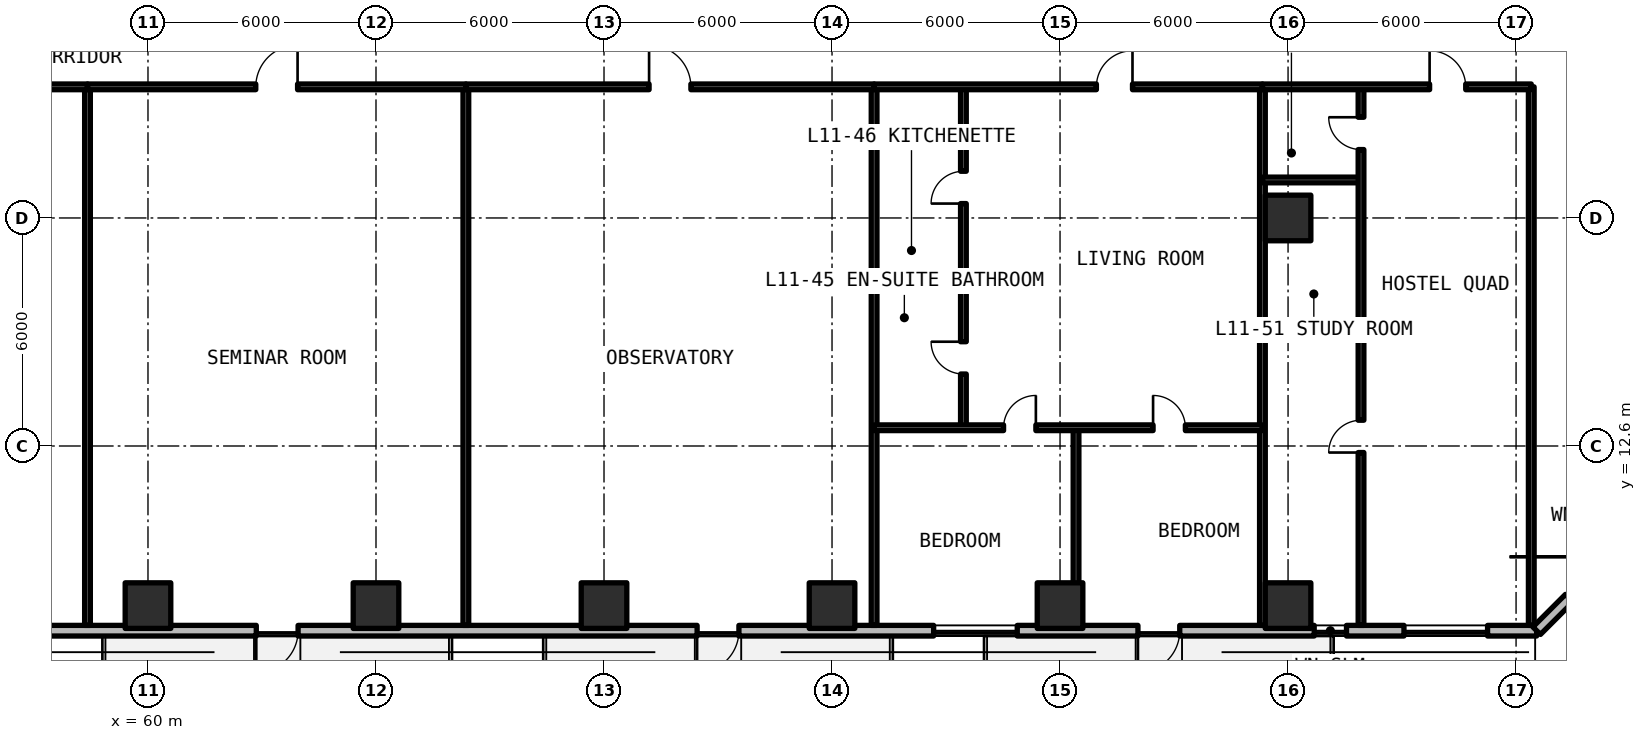
"""IFC4 building model, lengths in metres.
Left out: names, types, materials, properties, quantities, classifications, styles, units other than length and angle.
Written with IfcOpenShell. Run it as: python <this file> out.ifc"""

import sys

from ifc_helpers import new_model, si_unit, direction, frame, frame_2d, origin, origin_2d, place, context, subcontext, project, spatial, rectangle, extrude, element, fill, save


model = new_model("IFC4")
c1 = context("Model", 3, precision=1e-05, world=origin(), true_north=direction((0.0, 1.0)))
c2 = subcontext(c1, "Body", "Model", "MODEL_VIEW")
j1 = project(units=[si_unit("LENGTHUNIT", "METRE"), si_unit("PLANEANGLEUNIT", "RADIAN")], contexts=[c1])
p1 = place(None, origin())
s1 = spatial("IfcSite", under=j1, at=p1, CompositionType="ELEMENT")
p2 = place(p1, origin())
s2 = spatial("IfcBuilding", under=s1, at=p2, CompositionType="ELEMENT")
p3 = place(p2, frame((0.0, 0.0, 42.24)))
s3 = spatial("IfcBuildingStorey", under=s2, at=p3, CompositionType="ELEMENT", Elevation=42.24)
for number, where, z_axis, x_axis in (
    (1, (90.0, 18.6, 0.0), (0.0, 0.0, 1.0), (1.0, 0.0, 0.0)),
    (2, (60.0, 8.4, 0.0), (0.0, 0.0, 1.0), (1.0, 0.0, 0.0)),
    (3, (66.0, 8.4, 0.0), (0.0, 0.0, 1.0), (1.0, 0.0, 0.0)),
    (4, (72.0, 8.4, 0.0), (0.0, 0.0, 1.0), (1.0, 0.0, 0.0)),
    (5, (78.0, 8.4, 0.0), (0.0, 0.0, 1.0), (1.0, 0.0, 0.0)),
    (6, (84.0, 8.4, 0.0), (0.0, 0.0, 1.0), (1.0, 0.0, 0.0)),
    (7, (90.0, 8.4, 0.0), (0.0, 0.0, 1.0), (1.0, 0.0, 0.0)),
):
    element("IfcColumn", number, at=place(p3, frame(where, z_axis=z_axis, x_axis=x_axis)), inside=s3, PredefinedType="COLUMN", context=c2, shape_type="SweptSolid", body=[
        extrude(rectangle(XDim=1.2, YDim=1.2, at=origin_2d()), origin(), (0.0, 0.0, 1.0), 3.3),
    ])
p4 = place(p3, frame((52.14, 7.74, 0.0), z_axis=(0.0, 0.0, 1.0), x_axis=(1.0, 0.0, 0.0)))
e8 = element("IfcWall", 8, at=p4, inside=s3, PredefinedType="SOLIDWALL", context=c2, shape_type="SweptSolid", body=[
    extrude(rectangle(XDim=44.402, YDim=0.28, at=frame_2d((22.201, 0.0))), origin(), (0.0, 0.0, 1.0), 3.08),
])
p5 = place(p4, frame((10.71, 0.0, 0.0)))
e9 = element("IfcOpeningElement", 9, at=p5, cuts=e8, PredefinedType="OPENING", context=c2, shape_type="SweptSolid", body=[
    extrude(rectangle(XDim=1.1, YDim=2.15, at=frame_2d((0.55, 1.075))), frame((0.0, 0.15, 0.0), z_axis=(0.0, -1.0, 0.0), x_axis=(1.0, 0.0, 0.0)), (0.0, 0.0, 1.0), 0.3),
])
p6 = place(p4, frame((22.31, 0.0, 0.0)))
e10 = element("IfcOpeningElement", 10, at=p6, cuts=e8, PredefinedType="OPENING", context=c2, shape_type="SweptSolid", body=[
    extrude(rectangle(XDim=1.1, YDim=2.15, at=frame_2d((0.55, 1.075))), frame((0.0, 0.15, 0.0), z_axis=(0.0, -1.0, 0.0), x_axis=(1.0, 0.0, 0.0)), (0.0, 0.0, 1.0), 0.3),
])
p7 = place(p4, frame((33.91, 0.0, 0.0)))
e11 = element("IfcOpeningElement", 11, at=p7, cuts=e8, PredefinedType="OPENING", context=c2, shape_type="SweptSolid", body=[
    extrude(rectangle(XDim=1.1, YDim=2.15, at=frame_2d((0.55, 1.075))), frame((0.0, 0.15, 0.0), z_axis=(0.0, -1.0, 0.0), x_axis=(1.0, 0.0, 0.0)), (0.0, 0.0, 1.0), 0.3),
])
p8 = place(p4, frame((2.664, 0.0, 0.78)))
e12 = element("IfcOpeningElement", 12, at=p8, cuts=e8, PredefinedType="OPENING", context=c2, shape_type="SweptSolid", body=[
    extrude(rectangle(XDim=2.2, YDim=1.66, at=frame_2d((1.1, 0.83))), frame((0.0, 0.15, 0.0), z_axis=(0.0, -1.0, 0.0), x_axis=(1.0, 0.0, 0.0)), (0.0, 0.0, 1.0), 0.3),
])
p9 = place(p4, frame((28.534, 0.0, 0.78)))
e13 = element("IfcOpeningElement", 13, at=p9, cuts=e8, PredefinedType="OPENING", context=c2, shape_type="SweptSolid", body=[
    extrude(rectangle(XDim=2.2, YDim=1.66, at=frame_2d((1.1, 0.83))), frame((0.0, 0.15, 0.0), z_axis=(0.0, -1.0, 0.0), x_axis=(1.0, 0.0, 0.0)), (0.0, 0.0, 1.0), 0.3),
])
p10 = place(p4, frame((38.548, 0.0, 0.78)))
e14 = element("IfcOpeningElement", 14, at=p10, cuts=e8, PredefinedType="OPENING", context=c2, shape_type="SweptSolid", body=[
    extrude(rectangle(XDim=0.85, YDim=1.65, at=frame_2d((0.425, 0.825))), frame((0.0, 0.15, 0.0), z_axis=(0.0, -1.0, 0.0), x_axis=(1.0, 0.0, 0.0)), (0.0, 0.0, 1.0), 0.3),
])
p11 = place(p4, frame((40.91, 0.0, 0.78)))
e15 = element("IfcOpeningElement", 15, at=p11, cuts=e8, PredefinedType="OPENING", context=c2, shape_type="SweptSolid", body=[
    extrude(rectangle(XDim=2.2, YDim=1.66, at=frame_2d((1.1, 0.83))), frame((0.0, 0.15, 0.0), z_axis=(0.0, -1.0, 0.0), x_axis=(1.0, 0.0, 0.0)), (0.0, 0.0, 1.0), 0.3),
])
p12 = place(p3, frame((96.542, 7.74, 0.0), z_axis=(0.0, 0.0, 1.0), x_axis=(0.707106781187, 0.707106781187, 0.0)))
e16 = element("IfcWall", 16, at=p12, inside=s3, PredefinedType="SOLIDWALL", context=c2, shape_type="SweptSolid", body=[
    extrude(rectangle(XDim=5.824, YDim=0.28, at=frame_2d((2.912, 0.0))), origin(), (0.0, 0.0, 1.0), 3.08),
])
p13 = place(p12, frame((1.212, 0.0, 0.78)))
e17 = element("IfcOpeningElement", 17, at=p13, cuts=e16, PredefinedType="OPENING", context=c2, shape_type="SweptSolid", body=[
    extrude(rectangle(XDim=3.4, YDim=1.66, at=frame_2d((1.7, 0.83))), frame((0.0, 0.15, 0.0), z_axis=(0.0, -1.0, 0.0), x_axis=(1.0, 0.0, 0.0)), (0.0, 0.0, 1.0), 0.3),
])
for number, where, z_axis, x_axis in (
    (18, (96.4, 7.88, 0.0), (0.0, 0.0, 1.0), (0.0, 1.0, 0.0)),
    (19, (58.408, 7.88, 0.0), (0.0, 0.0, 1.0), (0.0, 1.0, 0.0)),
):
    element("IfcWall", number, at=place(p3, frame(where, z_axis=z_axis, x_axis=x_axis)), inside=s3, PredefinedType="SOLIDWALL", context=c2, shape_type="SweptSolid", body=[
        extrude(rectangle(XDim=14.17, YDim=0.15, at=frame_2d((7.085, 0.0))), origin(), (0.0, 0.0, 1.0), 2.35),
    ])
p14 = place(p3, frame((52.12, 22.05, 0.0), z_axis=(0.0, 0.0, 1.0), x_axis=(1.0, 0.0, 0.0)))
e20 = element("IfcWall", 20, at=p14, inside=s3, PredefinedType="SOLIDWALL", context=c2, shape_type="SweptSolid", body=[
    extrude(rectangle(XDim=6.288, YDim=0.15, at=frame_2d((3.144, 0.0))), origin(), (0.0, 0.0, 1.0), 2.35),
])
p15 = place(p14, frame((2.669, 0.0, 0.0)))
e21 = element("IfcOpeningElement", 21, at=p15, cuts=e20, PredefinedType="OPENING", context=c2, shape_type="SweptSolid", body=[
    extrude(rectangle(XDim=0.95, YDim=2.15, at=frame_2d((0.475, 1.075))), frame((0.0, 0.085, 0.0), z_axis=(0.0, -1.0, 0.0), x_axis=(1.0, 0.0, 0.0)), (0.0, 0.0, 1.0), 0.17),
])
p16 = place(p3, frame((68.365, 7.88, 0.0), z_axis=(0.0, 0.0, 1.0), x_axis=(0.0, 1.0, 0.0)))
e22 = element("IfcWall", 22, at=p16, inside=s3, PredefinedType="SOLIDWALL", context=c2, shape_type="SweptSolid", body=[
    extrude(rectangle(XDim=14.17, YDim=0.15, at=frame_2d((7.085, 0.0))), origin(), (0.0, 0.0, 1.0), 2.35),
])
p17 = place(p3, frame((58.408, 22.05, 0.0), z_axis=(0.0, 0.0, 1.0), x_axis=(1.0, 0.0, 0.0)))
e23 = element("IfcWall", 23, at=p17, inside=s3, PredefinedType="SOLIDWALL", context=c2, shape_type="SweptSolid", body=[
    extrude(rectangle(XDim=9.957, YDim=0.15, at=frame_2d((4.978, 0.0))), origin(), (0.0, 0.0, 1.0), 2.35),
])
p18 = place(p17, frame((4.428, 0.0, 0.0)))
e24 = element("IfcOpeningElement", 24, at=p18, cuts=e23, PredefinedType="OPENING", context=c2, shape_type="SweptSolid", body=[
    extrude(rectangle(XDim=1.1, YDim=2.15, at=frame_2d((0.55, 1.075))), frame((0.0, 0.085, 0.0), z_axis=(0.0, -1.0, 0.0), x_axis=(1.0, 0.0, 0.0)), (0.0, 0.0, 1.0), 0.17),
])
p19 = place(p3, frame((79.107, 7.88, 0.0), z_axis=(0.0, 0.0, 1.0), x_axis=(0.0, 1.0, 0.0)))
e25 = element("IfcWall", 25, at=p19, inside=s3, PredefinedType="SOLIDWALL", context=c2, shape_type="SweptSolid", body=[
    extrude(rectangle(XDim=14.17, YDim=0.15, at=frame_2d((7.085, 0.0))), origin(), (0.0, 0.0, 1.0), 2.35),
])
p20 = place(p3, frame((68.365, 22.05, 0.0), z_axis=(0.0, 0.0, 1.0), x_axis=(1.0, 0.0, 0.0)))
e26 = element("IfcWall", 26, at=p20, inside=s3, PredefinedType="SOLIDWALL", context=c2, shape_type="SweptSolid", body=[
    extrude(rectangle(XDim=10.742, YDim=0.15, at=frame_2d((5.371, 0.0))), origin(), (0.0, 0.0, 1.0), 2.35),
])
p21 = place(p20, frame((4.821, 0.0, 0.0)))
e27 = element("IfcOpeningElement", 27, at=p21, cuts=e26, PredefinedType="OPENING", context=c2, shape_type="SweptSolid", body=[
    extrude(rectangle(XDim=1.1, YDim=2.15, at=frame_2d((0.55, 1.075))), frame((0.0, 0.085, 0.0), z_axis=(0.0, -1.0, 0.0), x_axis=(1.0, 0.0, 0.0)), (0.0, 0.0, 1.0), 0.17),
])
p22 = place(p3, frame((89.326, 7.88, 0.0), z_axis=(0.0, 0.0, 1.0), x_axis=(0.0, 1.0, 0.0)))
e28 = element("IfcWall", 28, at=p22, inside=s3, PredefinedType="SOLIDWALL", context=c2, shape_type="SweptSolid", body=[
    extrude(rectangle(XDim=14.17, YDim=0.15, at=frame_2d((7.085, 0.0))), origin(), (0.0, 0.0, 1.0), 2.35),
])
p23 = place(p3, frame((79.107, 16.758, 0.0), z_axis=(0.0, 0.0, 1.0), x_axis=(1.0, 0.0, 0.0)))
e29 = element("IfcWall", 29, at=p23, inside=s3, PredefinedType="PARTITIONING", context=c2, shape_type="SweptSolid", body=[
    extrude(rectangle(XDim=2.35, YDim=0.15, at=frame_2d((1.175, 0.0))), origin(), (0.0, 0.0, 1.0), 2.35),
])
p24 = place(p3, frame((81.457, 13.08, 0.0), z_axis=(0.0, 0.0, 1.0), x_axis=(0.0, 1.0, 0.0)))
e30 = element("IfcWall", 30, at=p24, inside=s3, PredefinedType="PARTITIONING", context=c2, shape_type="SweptSolid", body=[
    extrude(rectangle(XDim=8.97, YDim=0.15, at=frame_2d((4.485, 0.0))), origin(), (0.0, 0.0, 1.0), 2.35),
])
p25 = place(p24, frame((1.414, 0.0, 0.0)))
e31 = element("IfcOpeningElement", 31, at=p25, cuts=e30, PredefinedType="OPENING", context=c2, shape_type="SweptSolid", body=[
    extrude(rectangle(XDim=0.85, YDim=2.1, at=frame_2d((0.425, 1.05))), frame((0.0, 0.085, 0.0), z_axis=(0.0, -1.0, 0.0), x_axis=(1.0, 0.0, 0.0)), (0.0, 0.0, 1.0), 0.17),
])
p26 = place(p24, frame((5.899, 0.0, 0.0)))
e32 = element("IfcOpeningElement", 32, at=p26, cuts=e30, PredefinedType="OPENING", context=c2, shape_type="SweptSolid", body=[
    extrude(rectangle(XDim=0.85, YDim=2.1, at=frame_2d((0.425, 1.05))), frame((0.0, 0.085, 0.0), z_axis=(0.0, -1.0, 0.0), x_axis=(1.0, 0.0, 0.0)), (0.0, 0.0, 1.0), 0.17),
])
p27 = place(p3, frame((84.421, 7.88, 0.0), z_axis=(0.0, 0.0, 1.0), x_axis=(0.0, 1.0, 0.0)))
e33 = element("IfcWall", 33, at=p27, inside=s3, PredefinedType="PARTITIONING", context=c2, shape_type="SweptSolid", body=[
    extrude(rectangle(XDim=5.2, YDim=0.15, at=frame_2d((2.6, 0.0))), origin(), (0.0, 0.0, 1.0), 2.35),
])
p28 = place(p3, frame((79.107, 13.08, 0.0), z_axis=(0.0, 0.0, 1.0), x_axis=(1.0, 0.0, 0.0)))
e34 = element("IfcWall", 34, at=p28, inside=s3, PredefinedType="PARTITIONING", context=c2, shape_type="SweptSolid", body=[
    extrude(rectangle(XDim=10.219, YDim=0.15, at=frame_2d((5.109, 0.0))), origin(), (0.0, 0.0, 1.0), 2.35),
])
p29 = place(p28, frame((3.407, 0.0, 0.0)))
e35 = element("IfcOpeningElement", 35, at=p29, cuts=e34, PredefinedType="OPENING", context=c2, shape_type="SweptSolid", body=[
    extrude(rectangle(XDim=0.85, YDim=2.1, at=frame_2d((0.425, 1.05))), frame((0.0, 0.085, 0.0), z_axis=(0.0, -1.0, 0.0), x_axis=(1.0, 0.0, 0.0)), (0.0, 0.0, 1.0), 0.17),
])
p30 = place(p28, frame((7.341, 0.0, 0.0)))
e36 = element("IfcOpeningElement", 36, at=p30, cuts=e34, PredefinedType="OPENING", context=c2, shape_type="SweptSolid", body=[
    extrude(rectangle(XDim=0.85, YDim=2.1, at=frame_2d((0.425, 1.05))), frame((0.0, 0.085, 0.0), z_axis=(0.0, -1.0, 0.0), x_axis=(1.0, 0.0, 0.0)), (0.0, 0.0, 1.0), 0.17),
])
p31 = place(p3, frame((79.107, 22.05, 0.0), z_axis=(0.0, 0.0, 1.0), x_axis=(1.0, 0.0, 0.0)))
e37 = element("IfcWall", 37, at=p31, inside=s3, PredefinedType="SOLIDWALL", context=c2, shape_type="SweptSolid", body=[
    extrude(rectangle(XDim=10.219, YDim=0.15, at=frame_2d((5.109, 0.0))), origin(), (0.0, 0.0, 1.0), 2.35),
])
p32 = place(p31, frame((5.849, 0.0, 0.0)))
e38 = element("IfcOpeningElement", 38, at=p32, cuts=e37, PredefinedType="OPENING", context=c2, shape_type="SweptSolid", body=[
    extrude(rectangle(XDim=0.95, YDim=2.15, at=frame_2d((0.475, 1.075))), frame((0.0, 0.085, 0.0), z_axis=(0.0, -1.0, 0.0), x_axis=(1.0, 0.0, 0.0)), (0.0, 0.0, 1.0), 0.17),
])
p33 = place(p3, frame((89.326, 19.6, 0.0), z_axis=(0.0, 0.0, 1.0), x_axis=(1.0, 0.0, 0.0)))
e39 = element("IfcWall", 39, at=p33, inside=s3, PredefinedType="PARTITIONING", context=c2, shape_type="SweptSolid", body=[
    extrude(rectangle(XDim=2.594, YDim=0.15, at=frame_2d((1.297, 0.0))), origin(), (0.0, 0.0, 1.0), 2.35),
])
p34 = place(p3, frame((91.92, 7.88, 0.0), z_axis=(0.0, 0.0, 1.0), x_axis=(0.0, 1.0, 0.0)))
e40 = element("IfcWall", 40, at=p34, inside=s3, PredefinedType="PARTITIONING", context=c2, shape_type="SweptSolid", body=[
    extrude(rectangle(XDim=14.17, YDim=0.15, at=frame_2d((7.085, 0.0))), origin(), (0.0, 0.0, 1.0), 2.35),
])
p35 = place(p34, frame((4.548, 0.0, 0.0)))
e41 = element("IfcOpeningElement", 41, at=p35, cuts=e40, PredefinedType="OPENING", context=c2, shape_type="SweptSolid", body=[
    extrude(rectangle(XDim=0.85, YDim=2.1, at=frame_2d((0.425, 1.05))), frame((0.0, 0.085, 0.0), z_axis=(0.0, -1.0, 0.0), x_axis=(1.0, 0.0, 0.0)), (0.0, 0.0, 1.0), 0.17),
])
p36 = place(p34, frame((12.52, 0.0, 0.0)))
e42 = element("IfcOpeningElement", 42, at=p36, cuts=e40, PredefinedType="OPENING", context=c2, shape_type="SweptSolid", body=[
    extrude(rectangle(XDim=0.85, YDim=2.1, at=frame_2d((0.425, 1.05))), frame((0.0, 0.085, 0.0), z_axis=(0.0, -1.0, 0.0), x_axis=(1.0, 0.0, 0.0)), (0.0, 0.0, 1.0), 0.17),
])
p37 = place(p3, frame((89.326, 22.05, 0.0), z_axis=(0.0, 0.0, 1.0), x_axis=(1.0, 0.0, 0.0)))
e43 = element("IfcWall", 43, at=p37, inside=s3, PredefinedType="SOLIDWALL", context=c2, shape_type="SweptSolid", body=[
    extrude(rectangle(XDim=7.074, YDim=0.15, at=frame_2d((3.537, 0.0))), origin(), (0.0, 0.0, 1.0), 2.35),
])
p38 = place(p37, frame((4.399, 0.0, 0.0)))
e44 = element("IfcOpeningElement", 44, at=p38, cuts=e43, PredefinedType="OPENING", context=c2, shape_type="SweptSolid", body=[
    extrude(rectangle(XDim=0.95, YDim=2.15, at=frame_2d((0.475, 1.075))), frame((0.0, 0.085, 0.0), z_axis=(0.0, -1.0, 0.0), x_axis=(1.0, 0.0, 0.0)), (0.0, 0.0, 1.0), 0.17),
])
p39 = place(p5, frame((1.1, 0.0, 0.0), z_axis=(0.0, 0.0, 1.0), x_axis=(-1.0, 0.0, 0.0)))
e45 = element("IfcDoor", 45, at=p39, inside=s3, OperationType="SINGLE_SWING_LEFT", PredefinedType="DOOR", context=c2, shape_type="SweptSolid", body=[
    extrude(rectangle(XDim=1.1, YDim=2.15, at=frame_2d((0.55, 1.075))), frame((0.0, 0.025, 0.0), z_axis=(0.0, -1.0, 0.0), x_axis=(1.0, 0.0, 0.0)), (0.0, 0.0, 1.0), 0.05),
])
fill(e9, e45)
p40 = place(p6, frame((1.1, 0.0, 0.0), z_axis=(0.0, 0.0, 1.0), x_axis=(-1.0, 0.0, 0.0)))
e46 = element("IfcDoor", 46, at=p40, inside=s3, OperationType="SINGLE_SWING_RIGHT", PredefinedType="DOOR", context=c2, shape_type="SweptSolid", body=[
    extrude(rectangle(XDim=1.1, YDim=2.15, at=frame_2d((0.55, 1.075))), frame((0.0, 0.025, 0.0), z_axis=(0.0, -1.0, 0.0), x_axis=(1.0, 0.0, 0.0)), (0.0, 0.0, 1.0), 0.05),
])
fill(e10, e46)
p41 = place(p7, frame((1.1, 0.0, 0.0), z_axis=(0.0, 0.0, 1.0), x_axis=(-1.0, 0.0, 0.0)))
e47 = element("IfcDoor", 47, at=p41, inside=s3, OperationType="SINGLE_SWING_LEFT", PredefinedType="DOOR", context=c2, shape_type="SweptSolid", body=[
    extrude(rectangle(XDim=1.1, YDim=2.15, at=frame_2d((0.55, 1.075))), frame((0.0, 0.025, 0.0), z_axis=(0.0, -1.0, 0.0), x_axis=(1.0, 0.0, 0.0)), (0.0, 0.0, 1.0), 0.05),
])
fill(e11, e47)
p42 = place(p9, origin())
e48 = element("IfcWindow", 48, at=p42, inside=s3, PartitioningType="SINGLE_PANEL", PredefinedType="WINDOW", context=c2, shape_type="SweptSolid", body=[
    extrude(rectangle(XDim=2.2, YDim=1.66, at=frame_2d((1.1, 0.83))), frame((0.0, 0.03, 0.0), z_axis=(0.0, -1.0, 0.0), x_axis=(1.0, 0.0, 0.0)), (0.0, 0.0, 1.0), 0.06),
])
fill(e13, e48)
p43 = place(p10, origin())
e49 = element("IfcWindow", 49, at=p43, inside=s3, PartitioningType="SINGLE_PANEL", PredefinedType="WINDOW", context=c2, shape_type="SweptSolid", body=[
    extrude(rectangle(XDim=0.85, YDim=1.65, at=frame_2d((0.425, 0.825))), frame((0.0, 0.03, 0.0), z_axis=(0.0, -1.0, 0.0), x_axis=(1.0, 0.0, 0.0)), (0.0, 0.0, 1.0), 0.06),
])
fill(e14, e49)
p44 = place(p11, origin())
e50 = element("IfcWindow", 50, at=p44, inside=s3, PartitioningType="SINGLE_PANEL", PredefinedType="WINDOW", context=c2, shape_type="SweptSolid", body=[
    extrude(rectangle(XDim=2.2, YDim=1.66, at=frame_2d((1.1, 0.83))), frame((0.0, 0.03, 0.0), z_axis=(0.0, -1.0, 0.0), x_axis=(1.0, 0.0, 0.0)), (0.0, 0.0, 1.0), 0.06),
])
fill(e15, e50)
p45 = place(p18, origin())
e51 = element("IfcDoor", 51, at=p45, inside=s3, OperationType="SINGLE_SWING_RIGHT", PredefinedType="DOOR", context=c2, shape_type="SweptSolid", body=[
    extrude(rectangle(XDim=1.1, YDim=2.15, at=frame_2d((0.55, 1.075))), frame((0.0, 0.025, 0.0), z_axis=(0.0, -1.0, 0.0), x_axis=(1.0, 0.0, 0.0)), (0.0, 0.0, 1.0), 0.05),
])
fill(e24, e51)
p46 = place(p21, origin())
e52 = element("IfcDoor", 52, at=p46, inside=s3, OperationType="SINGLE_SWING_LEFT", PredefinedType="DOOR", context=c2, shape_type="SweptSolid", body=[
    extrude(rectangle(XDim=1.1, YDim=2.15, at=frame_2d((0.55, 1.075))), frame((0.0, 0.025, 0.0), z_axis=(0.0, -1.0, 0.0), x_axis=(1.0, 0.0, 0.0)), (0.0, 0.0, 1.0), 0.05),
])
fill(e27, e52)
p47 = place(p25, origin())
e53 = element("IfcDoor", 53, at=p47, inside=s3, OperationType="SINGLE_SWING_RIGHT", PredefinedType="DOOR", context=c2, shape_type="SweptSolid", body=[
    extrude(rectangle(XDim=0.85, YDim=2.1, at=frame_2d((0.425, 1.05))), frame((0.0, 0.025, 0.0), z_axis=(0.0, -1.0, 0.0), x_axis=(1.0, 0.0, 0.0)), (0.0, 0.0, 1.0), 0.05),
])
fill(e31, e53)
p48 = place(p26, origin())
e54 = element("IfcDoor", 54, at=p48, inside=s3, OperationType="SINGLE_SWING_LEFT", PredefinedType="DOOR", context=c2, shape_type="SweptSolid", body=[
    extrude(rectangle(XDim=0.85, YDim=2.1, at=frame_2d((0.425, 1.05))), frame((0.0, 0.025, 0.0), z_axis=(0.0, -1.0, 0.0), x_axis=(1.0, 0.0, 0.0)), (0.0, 0.0, 1.0), 0.05),
])
fill(e32, e54)
p49 = place(p29, origin())
e55 = element("IfcDoor", 55, at=p49, inside=s3, OperationType="SINGLE_SWING_RIGHT", PredefinedType="DOOR", context=c2, shape_type="SweptSolid", body=[
    extrude(rectangle(XDim=0.85, YDim=2.1, at=frame_2d((0.425, 1.05))), frame((0.0, 0.025, 0.0), z_axis=(0.0, -1.0, 0.0), x_axis=(1.0, 0.0, 0.0)), (0.0, 0.0, 1.0), 0.05),
])
fill(e35, e55)
p50 = place(p30, origin())
e56 = element("IfcDoor", 56, at=p50, inside=s3, OperationType="SINGLE_SWING_LEFT", PredefinedType="DOOR", context=c2, shape_type="SweptSolid", body=[
    extrude(rectangle(XDim=0.85, YDim=2.1, at=frame_2d((0.425, 1.05))), frame((0.0, 0.025, 0.0), z_axis=(0.0, -1.0, 0.0), x_axis=(1.0, 0.0, 0.0)), (0.0, 0.0, 1.0), 0.05),
])
fill(e36, e56)
p51 = place(p32, origin())
e57 = element("IfcDoor", 57, at=p51, inside=s3, OperationType="SINGLE_SWING_RIGHT", PredefinedType="DOOR", context=c2, shape_type="SweptSolid", body=[
    extrude(rectangle(XDim=0.95, YDim=2.15, at=frame_2d((0.475, 1.075))), frame((0.0, 0.025, 0.0), z_axis=(0.0, -1.0, 0.0), x_axis=(1.0, 0.0, 0.0)), (0.0, 0.0, 1.0), 0.05),
])
fill(e38, e57)
p52 = place(p35, origin())
e58 = element("IfcDoor", 58, at=p52, inside=s3, OperationType="SINGLE_SWING_LEFT", PredefinedType="DOOR", context=c2, shape_type="SweptSolid", body=[
    extrude(rectangle(XDim=0.85, YDim=2.1, at=frame_2d((0.425, 1.05))), frame((0.0, 0.025, 0.0), z_axis=(0.0, -1.0, 0.0), x_axis=(1.0, 0.0, 0.0)), (0.0, 0.0, 1.0), 0.05),
])
fill(e41, e58)
p53 = place(p36, origin())
e59 = element("IfcDoor", 59, at=p53, inside=s3, OperationType="SINGLE_SWING_RIGHT", PredefinedType="DOOR", context=c2, shape_type="SweptSolid", body=[
    extrude(rectangle(XDim=0.85, YDim=2.1, at=frame_2d((0.425, 1.05))), frame((0.0, 0.025, 0.0), z_axis=(0.0, -1.0, 0.0), x_axis=(1.0, 0.0, 0.0)), (0.0, 0.0, 1.0), 0.05),
])
fill(e42, e59)
p54 = place(p38, origin())
e60 = element("IfcDoor", 60, at=p54, inside=s3, OperationType="SINGLE_SWING_LEFT", PredefinedType="DOOR", context=c2, shape_type="SweptSolid", body=[
    extrude(rectangle(XDim=0.95, YDim=2.15, at=frame_2d((0.475, 1.075))), frame((0.0, 0.025, 0.0), z_axis=(0.0, -1.0, 0.0), x_axis=(1.0, 0.0, 0.0)), (0.0, 0.0, 1.0), 0.05),
])
fill(e44, e60)
save(model, sys.argv[1])
